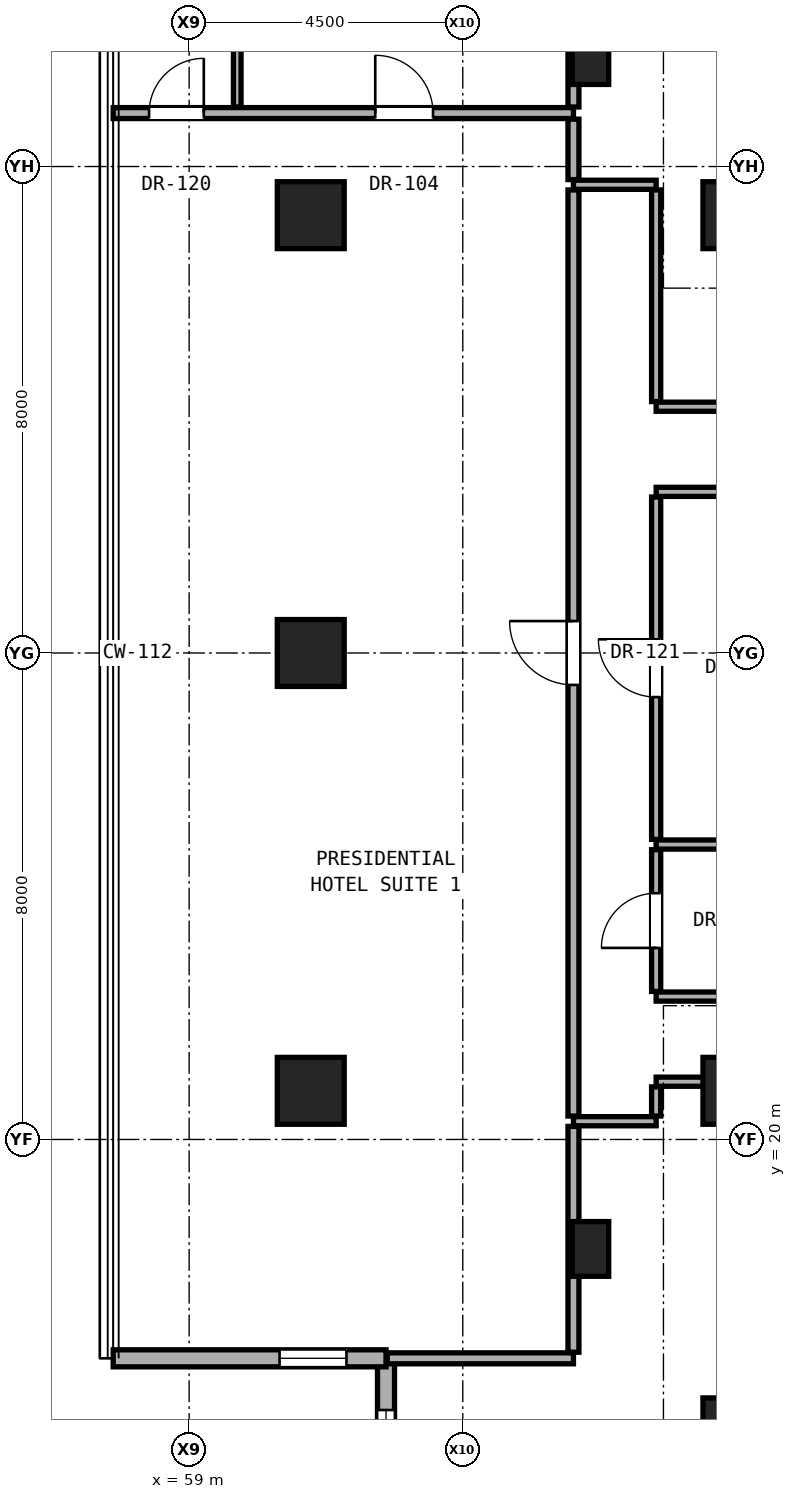
"""IFC4 building model, lengths in metres.
Left out: names, types, materials, properties, quantities, classifications, styles, units other than length and angle.
Written with IfcOpenShell. Run it as: python <this file> out.ifc"""

import sys

from ifc_helpers import new_model, si_unit, direction, frame, frame_2d, origin, origin_2d, place, context, subcontext, project, spatial, rectangle, hollow_rectangle, extrude, element, fill, save


model = new_model("IFC4")
c1 = context("Model", 3, precision=1e-05, world=origin(), true_north=direction((0.0, 1.0)))
c2 = subcontext(c1, "Body", "Model", "MODEL_VIEW")
j1 = project(units=[si_unit("LENGTHUNIT", "METRE"), si_unit("PLANEANGLEUNIT", "RADIAN")], contexts=[c1])
p1 = place(None, origin())
s1 = spatial("IfcSite", under=j1, at=p1, CompositionType="ELEMENT")
p2 = place(p1, origin())
s2 = spatial("IfcBuilding", under=s1, at=p2, CompositionType="ELEMENT")
p3 = place(p2, frame((0.0, 0.0, 144.5)))
s3 = spatial("IfcBuildingStorey", under=s2, at=p3, CompositionType="ELEMENT", Elevation=144.5)
for number, where, z_axis, x_axis in (
    (1, (68.0, 15.2, 0.0), (0.0, 0.0, 1.0), (1.0, 0.0, 0.0)),
    (2, (68.0, 20.8, 0.0), (0.0, 0.0, 1.0), (1.0, 0.0, 0.0)),
    (3, (68.0, 35.2, 0.0), (0.0, 0.0, 1.0), (1.0, 0.0, 0.0)),
):
    element("IfcColumn", number, at=place(p3, frame(where, z_axis=z_axis, x_axis=x_axis)), inside=s3, PredefinedType="COLUMN", context=c2, shape_type="SweptSolid", body=[
        extrude(rectangle(XDim=1.1, YDim=1.1, at=origin_2d()), origin(), (0.0, 0.0, 1.0), 3.3),
    ])
for number, where, z_axis, x_axis in (
    (4, (61.0, 20.8, 0.0), (0.0, 0.0, 1.0), (1.0, 0.0, 0.0)),
    (5, (61.0, 28.0, 0.0), (0.0, 0.0, 1.0), (1.0, 0.0, 0.0)),
    (6, (61.0, 35.2, 0.0), (0.0, 0.0, 1.0), (1.0, 0.0, 0.0)),
):
    element("IfcColumn", number, at=place(p3, frame(where, z_axis=z_axis, x_axis=x_axis)), inside=s3, PredefinedType="COLUMN", context=c2, shape_type="SweptSolid", body=[
        extrude(hollow_rectangle(XDim=1.1, YDim=1.1, WallThickness=0.06, at=origin_2d()), origin(), (0.0, 0.0, 1.0), 3.3),
    ])
for number, where, z_axis, x_axis in (
    (7, (65.6, 18.2, 0.0), (0.0, 0.0, 1.0), (1.0, 0.0, 0.0)),
    (8, (65.6, 37.8, 0.0), (0.0, 0.0, 1.0), (1.0, 0.0, 0.0)),
):
    element("IfcColumn", number, at=place(p3, frame(where, z_axis=z_axis, x_axis=x_axis)), inside=s3, PredefinedType="PILASTER", context=c2, shape_type="SweptSolid", body=[
        extrude(rectangle(XDim=0.6, YDim=0.9, at=origin_2d()), origin(), (0.0, 0.0, 1.0), 3.3),
    ])
p4 = place(p3, frame((62.238, 16.401, 0.0), z_axis=(0.0, 0.0, 1.0), x_axis=(0.0, -1.0, 0.0)))
e9 = element("IfcWall", 9, at=p4, inside=s3, PredefinedType="SOLIDWALL", context=c2, shape_type="SweptSolid", body=[
    extrude(rectangle(XDim=4.487, YDim=0.28, at=frame_2d((2.243, 0.0))), origin(), (0.0, 0.0, 1.0), 2.56),
])
p5 = place(p4, frame((0.85, 0.0, 0.31)))
e10 = element("IfcOpeningElement", 10, at=p5, cuts=e9, PredefinedType="OPENING", context=c2, shape_type="SweptSolid", body=[
    extrude(rectangle(XDim=1.2, YDim=2.1, at=frame_2d((0.6, 1.05))), frame((0.0, 0.15, 0.0), z_axis=(0.0, -1.0, 0.0), x_axis=(1.0, 0.0, 0.0)), (0.0, 0.0, 1.0), 0.3),
])
p6 = place(p3, frame((57.751, 16.401, 0.0), z_axis=(0.0, 0.0, 1.0), x_axis=(1.0, 0.0, 0.0)))
e11 = element("IfcWall", 11, at=p6, inside=s3, PredefinedType="SOLIDWALL", context=c2, shape_type="SweptSolid", body=[
    extrude(rectangle(XDim=4.487, YDim=0.28, at=frame_2d((2.243, 0.0))), origin(), (0.0, 0.0, 1.0), 2.56),
])
p7 = place(p6, frame((2.736, 0.0, 0.41)))
e12 = element("IfcOpeningElement", 12, at=p7, cuts=e11, PredefinedType="OPENING", context=c2, shape_type="SweptSolid", body=[
    extrude(rectangle(XDim=1.1, YDim=2.0, at=frame_2d((0.55, 1.0))), frame((0.0, 0.15, 0.0), z_axis=(0.0, -1.0, 0.0), x_axis=(1.0, 0.0, 0.0)), (0.0, 0.0, 1.0), 0.3),
])
p8 = place(p3, frame((62.258, 16.401, 0.0), z_axis=(0.0, 0.0, 1.0), x_axis=(1.0, 0.0, 0.0)))
e13 = element("IfcWall", 13, at=p8, inside=s3, PredefinedType="PARTITIONING", context=c2, shape_type="SweptSolid", body=[
    extrude(rectangle(XDim=3.062, YDim=0.18, at=frame_2d((1.531, 0.0))), origin(), (0.0, 0.0, 1.0), 2.94),
])
p9 = place(p3, frame((65.32, 20.3, 0.0), z_axis=(0.0, 0.0, 1.0), x_axis=(1.0, 0.0, 0.0)))
e14 = element("IfcWall", 14, at=p9, inside=s3, PredefinedType="PARTITIONING", context=c2, shape_type="SweptSolid", body=[
    extrude(rectangle(XDim=1.36, YDim=0.15, at=frame_2d((0.68, 0.0))), origin(), (0.0, 0.0, 1.0), 2.94),
])
p10 = place(p3, frame((66.68, 20.95, 0.0), z_axis=(0.0, 0.0, 1.0), x_axis=(1.0, 0.0, 0.0)))
e15 = element("IfcWall", 15, at=p10, inside=s3, PredefinedType="PARTITIONING", context=c2, shape_type="SweptSolid", body=[
    extrude(rectangle(XDim=1.05, YDim=0.15, at=frame_2d((0.525, 0.0))), origin(), (0.0, 0.0, 1.0), 2.332),
])
p11 = place(p3, frame((66.68, 22.35, 0.0), z_axis=(0.0, 0.0, 1.0), x_axis=(1.0, 0.0, 0.0)))
e16 = element("IfcWall", 16, at=p11, inside=s3, PredefinedType="PARTITIONING", context=c2, shape_type="SweptSolid", body=[
    extrude(rectangle(XDim=19.5, YDim=0.15, at=frame_2d((9.75, 0.0))), origin(), (0.0, 0.0, 1.0), 2.316),
])
p12 = place(p11, frame((8.802, 0.0, 0.0)))
e17 = element("IfcOpeningElement", 17, at=p12, cuts=e16, PredefinedType="OPENING", context=c2, shape_type="SweptSolid", body=[
    extrude(rectangle(XDim=1.05, YDim=2.2, at=frame_2d((0.525, 1.1))), frame((0.0, 0.085, 0.0), z_axis=(0.0, -1.0, 0.0), x_axis=(1.0, 0.0, 0.0)), (0.0, 0.0, 1.0), 0.17),
])
p13 = place(p11, frame((15.846, 0.0, 0.0)))
e18 = element("IfcOpeningElement", 18, at=p13, cuts=e16, PredefinedType="OPENING", context=c2, shape_type="SweptSolid", body=[
    extrude(rectangle(XDim=1.05, YDim=2.2, at=frame_2d((0.525, 1.1))), frame((0.0, 0.085, 0.0), z_axis=(0.0, -1.0, 0.0), x_axis=(1.0, 0.0, 0.0)), (0.0, 0.0, 1.0), 0.17),
])
p14 = place(p3, frame((66.68, 24.85, 0.0), z_axis=(0.0, 0.0, 1.0), x_axis=(1.0, 0.0, 0.0)))
e19 = element("IfcWall", 19, at=p14, inside=s3, PredefinedType="PARTITIONING", context=c2, shape_type="SweptSolid", body=[
    extrude(rectangle(XDim=3.07, YDim=0.15, at=frame_2d((1.535, 0.0))), origin(), (0.0, 0.0, 1.0), 2.316),
])
p15 = place(p3, frame((66.68, 30.65, 0.0), z_axis=(0.0, 0.0, 1.0), x_axis=(1.0, 0.0, 0.0)))
e20 = element("IfcWall", 20, at=p15, inside=s3, PredefinedType="PARTITIONING", context=c2, shape_type="SweptSolid", body=[
    extrude(rectangle(XDim=19.5, YDim=0.15, at=frame_2d((9.75, 0.0))), origin(), (0.0, 0.0, 1.0), 2.316),
])
p16 = place(p15, frame((3.745, 0.0, 0.0)))
e21 = element("IfcOpeningElement", 21, at=p16, cuts=e20, PredefinedType="OPENING", context=c2, shape_type="SweptSolid", body=[
    extrude(rectangle(XDim=0.95, YDim=2.15, at=frame_2d((0.475, 1.075))), frame((0.0, 0.085, 0.0), z_axis=(0.0, -1.0, 0.0), x_axis=(1.0, 0.0, 0.0)), (0.0, 0.0, 1.0), 0.17),
])
p17 = place(p15, frame((8.802, 0.0, 0.0)))
e22 = element("IfcOpeningElement", 22, at=p17, cuts=e20, PredefinedType="OPENING", context=c2, shape_type="SweptSolid", body=[
    extrude(rectangle(XDim=1.05, YDim=2.2, at=frame_2d((0.525, 1.1))), frame((0.0, 0.085, 0.0), z_axis=(0.0, -1.0, 0.0), x_axis=(1.0, 0.0, 0.0)), (0.0, 0.0, 1.0), 0.17),
])
p18 = place(p15, frame((15.846, 0.0, 0.0)))
e23 = element("IfcOpeningElement", 23, at=p18, cuts=e20, PredefinedType="OPENING", context=c2, shape_type="SweptSolid", body=[
    extrude(rectangle(XDim=1.05, YDim=2.2, at=frame_2d((0.525, 1.1))), frame((0.0, 0.085, 0.0), z_axis=(0.0, -1.0, 0.0), x_axis=(1.0, 0.0, 0.0)), (0.0, 0.0, 1.0), 0.17),
])
p19 = place(p3, frame((66.68, 32.05, 0.0), z_axis=(0.0, 0.0, 1.0), x_axis=(1.0, 0.0, 0.0)))
e24 = element("IfcWall", 24, at=p19, inside=s3, PredefinedType="PARTITIONING", context=c2, shape_type="SweptSolid", body=[
    extrude(rectangle(XDim=2.12, YDim=0.15, at=frame_2d((1.06, 0.0))), origin(), (0.0, 0.0, 1.0), 2.316),
])
p20 = place(p3, frame((65.32, 35.7, 0.0), z_axis=(0.0, 0.0, 1.0), x_axis=(1.0, 0.0, 0.0)))
e25 = element("IfcWall", 25, at=p20, inside=s3, PredefinedType="PARTITIONING", context=c2, shape_type="SweptSolid", body=[
    extrude(rectangle(XDim=1.36, YDim=0.15, at=frame_2d((0.68, 0.0))), origin(), (0.0, 0.0, 1.0), 2.94),
])
p21 = place(p3, frame((57.751, 36.879, 0.0), z_axis=(0.0, 0.0, 1.0), x_axis=(1.0, 0.0, 0.0)))
e26 = element("IfcWall", 26, at=p21, inside=s3, PredefinedType="PARTITIONING", context=c2, shape_type="SweptSolid", body=[
    extrude(rectangle(XDim=7.569, YDim=0.18, at=frame_2d((3.785, 0.0))), origin(), (0.0, 0.0, 1.0), 2.383),
])
p22 = place(p21, frame((4.31, 0.0, 0.0)))
e27 = element("IfcOpeningElement", 27, at=p22, cuts=e26, PredefinedType="OPENING", context=c2, shape_type="SweptSolid", body=[
    extrude(rectangle(XDim=0.95, YDim=2.15, at=frame_2d((0.475, 1.075))), frame((0.0, 0.1, 0.0), z_axis=(0.0, -1.0, 0.0), x_axis=(1.0, 0.0, 0.0)), (0.0, 0.0, 1.0), 0.2),
])
p23 = place(p21, frame((0.59, 0.0, 0.0)))
e28 = element("IfcOpeningElement", 28, at=p23, cuts=e26, PredefinedType="OPENING", context=c2, shape_type="SweptSolid", body=[
    extrude(rectangle(XDim=0.9, YDim=2.1, at=frame_2d((0.45, 1.05))), frame((0.0, 0.1, 0.0), z_axis=(0.0, -1.0, 0.0), x_axis=(1.0, 0.0, 0.0)), (0.0, 0.0, 1.0), 0.2),
])
p24 = place(p3, frame((59.791, 36.979, 0.0), z_axis=(0.0, 0.0, 1.0), x_axis=(0.0, 1.0, 0.0)))
e29 = element("IfcWall", 29, at=p24, inside=s3, PredefinedType="PARTITIONING", context=c2, shape_type="SweptSolid", body=[
    extrude(rectangle(XDim=2.62, YDim=0.125, at=frame_2d((1.31, 0.0))), origin(), (0.0, 0.0, 1.0), 2.94),
])
p25 = place(p3, frame((65.32, 16.501, 0.0), z_axis=(0.0, 0.0, 1.0), x_axis=(0.0, 1.0, 0.0)))
e30 = element("IfcWall", 30, at=p25, inside=s3, PredefinedType="PARTITIONING", context=c2, shape_type="SweptSolid", body=[
    extrude(rectangle(XDim=3.714, YDim=0.18, at=frame_2d((1.857, 0.0))), origin(), (0.0, 0.0, 1.0), 2.383),
])
p26 = place(p3, frame((65.32, 20.385, 0.0), z_axis=(0.0, 0.0, 1.0), x_axis=(0.0, 1.0, 0.0)))
e31 = element("IfcWall", 31, at=p26, inside=s3, PredefinedType="PARTITIONING", context=c2, shape_type="SweptSolid", body=[
    extrude(rectangle(XDim=15.23, YDim=0.18, at=frame_2d((7.615, 0.0))), origin(), (0.0, 0.0, 1.0), 2.316),
])
p27 = place(p26, frame((7.09, 0.0, 0.0)))
e32 = element("IfcOpeningElement", 32, at=p27, cuts=e31, PredefinedType="OPENING", context=c2, shape_type="SweptSolid", body=[
    extrude(rectangle(XDim=1.05, YDim=2.2, at=frame_2d((0.525, 1.1))), frame((0.0, 0.1, 0.0), z_axis=(0.0, -1.0, 0.0), x_axis=(1.0, 0.0, 0.0)), (0.0, 0.0, 1.0), 0.2),
])
p28 = place(p3, frame((65.32, 35.785, 0.0), z_axis=(0.0, 0.0, 1.0), x_axis=(0.0, 1.0, 0.0)))
e33 = element("IfcWall", 33, at=p28, inside=s3, PredefinedType="PARTITIONING", context=c2, shape_type="SweptSolid", body=[
    extrude(rectangle(XDim=0.994, YDim=0.18, at=frame_2d((0.497, 0.0))), origin(), (0.0, 0.0, 1.0), 2.94),
])
p29 = place(p3, frame((65.32, 36.979, 0.0), z_axis=(0.0, 0.0, 1.0), x_axis=(0.0, 1.0, 0.0)))
e34 = element("IfcWall", 34, at=p29, inside=s3, PredefinedType="PARTITIONING", context=c2, shape_type="SweptSolid", body=[
    extrude(rectangle(XDim=2.548, YDim=0.18, at=frame_2d((1.274, 0.0))), origin(), (0.0, 0.0, 1.0), 2.383),
])
p30 = place(p3, frame((66.68, 20.385, 0.0), z_axis=(0.0, 0.0, 1.0), x_axis=(0.0, 1.0, 0.0)))
e35 = element("IfcWall", 35, at=p30, inside=s3, PredefinedType="PARTITIONING", context=c2, shape_type="SweptSolid", body=[
    extrude(rectangle(XDim=0.48, YDim=0.15, at=frame_2d((0.24, 0.0))), origin(), (0.0, 0.0, 1.0), 2.332),
])
p31 = place(p3, frame((66.68, 22.435, 0.0), z_axis=(0.0, 0.0, 1.0), x_axis=(0.0, 1.0, 0.0)))
e36 = element("IfcWall", 36, at=p31, inside=s3, PredefinedType="PARTITIONING", context=c2, shape_type="SweptSolid", body=[
    extrude(rectangle(XDim=2.33, YDim=0.15, at=frame_2d((1.165, 0.0))), origin(), (0.0, 0.0, 1.0), 2.94),
])
p32 = place(p31, frame((0.715, 0.0, 0.0)))
e37 = element("IfcOpeningElement", 37, at=p32, cuts=e36, PredefinedType="OPENING", context=c2, shape_type="SweptSolid", body=[
    extrude(rectangle(XDim=0.9, YDim=2.1, at=frame_2d((0.45, 1.05))), frame((0.0, 0.085, 0.0), z_axis=(0.0, -1.0, 0.0), x_axis=(1.0, 0.0, 0.0)), (0.0, 0.0, 1.0), 0.17),
])
p33 = place(p3, frame((66.68, 24.935, 0.0), z_axis=(0.0, 0.0, 1.0), x_axis=(0.0, 1.0, 0.0)))
e38 = element("IfcWall", 38, at=p33, inside=s3, PredefinedType="PARTITIONING", context=c2, shape_type="SweptSolid", body=[
    extrude(rectangle(XDim=5.63, YDim=0.15, at=frame_2d((2.815, 0.0))), origin(), (0.0, 0.0, 1.0), 2.316),
])
p34 = place(p33, frame((2.34, 0.0, 0.0)))
e39 = element("IfcOpeningElement", 39, at=p34, cuts=e38, PredefinedType="OPENING", context=c2, shape_type="SweptSolid", body=[
    extrude(rectangle(XDim=0.95, YDim=2.15, at=frame_2d((0.475, 1.075))), frame((0.0, 0.085, 0.0), z_axis=(0.0, -1.0, 0.0), x_axis=(1.0, 0.0, 0.0)), (0.0, 0.0, 1.0), 0.17),
])
p35 = place(p3, frame((66.68, 32.135, 0.0), z_axis=(0.0, 0.0, 1.0), x_axis=(0.0, 1.0, 0.0)))
e40 = element("IfcWall", 40, at=p35, inside=s3, PredefinedType="PARTITIONING", context=c2, shape_type="SweptSolid", body=[
    extrude(rectangle(XDim=3.48, YDim=0.15, at=frame_2d((1.74, 0.0))), origin(), (0.0, 0.0, 1.0), 2.332),
])
p36 = place(p5, origin())
e41 = element("IfcWindow", 41, at=p36, inside=s3, PartitioningType="SINGLE_PANEL", PredefinedType="WINDOW", context=c2, shape_type="SweptSolid", body=[
    extrude(rectangle(XDim=1.2, YDim=2.1, at=frame_2d((0.6, 1.05))), frame((0.0, 0.03, 0.0), z_axis=(0.0, -1.0, 0.0), x_axis=(1.0, 0.0, 0.0)), (0.0, 0.0, 1.0), 0.06),
])
fill(e10, e41)
p37 = place(p7, origin())
e42 = element("IfcWindow", 42, at=p37, inside=s3, PartitioningType="SINGLE_PANEL", PredefinedType="WINDOW", context=c2, shape_type="SweptSolid", body=[
    extrude(rectangle(XDim=1.1, YDim=2.0, at=frame_2d((0.55, 1.0))), frame((0.0, 0.03, 0.0), z_axis=(0.0, -1.0, 0.0), x_axis=(1.0, 0.0, 0.0)), (0.0, 0.0, 1.0), 0.06),
])
fill(e12, e42)
p38 = place(p32, origin())
e43 = element("IfcDoor", 43, at=p38, inside=s3, OperationType="SINGLE_SWING_LEFT", PredefinedType="DOOR", context=c2, shape_type="SweptSolid", body=[
    extrude(rectangle(XDim=0.9, YDim=2.1, at=frame_2d((0.45, 1.05))), frame((0.0, 0.025, 0.0), z_axis=(0.0, -1.0, 0.0), x_axis=(1.0, 0.0, 0.0)), (0.0, 0.0, 1.0), 0.05),
])
fill(e37, e43)
p39 = place(p27, origin())
e44 = element("IfcDoor", 44, at=p39, inside=s3, OperationType="SINGLE_SWING_RIGHT", PredefinedType="DOOR", context=c2, shape_type="SweptSolid", body=[
    extrude(rectangle(XDim=1.05, YDim=2.2, at=frame_2d((0.525, 1.1))), frame((0.0, 0.025, 0.0), z_axis=(0.0, -1.0, 0.0), x_axis=(1.0, 0.0, 0.0)), (0.0, 0.0, 1.0), 0.05),
])
fill(e32, e44)
p40 = place(p22, origin())
e45 = element("IfcDoor", 45, at=p40, inside=s3, OperationType="SINGLE_SWING_LEFT", PredefinedType="DOOR", context=c2, shape_type="SweptSolid", body=[
    extrude(rectangle(XDim=0.95, YDim=2.15, at=frame_2d((0.475, 1.075))), frame((0.0, 0.025, 0.0), z_axis=(0.0, -1.0, 0.0), x_axis=(1.0, 0.0, 0.0)), (0.0, 0.0, 1.0), 0.05),
])
fill(e27, e45)
p41 = place(p23, origin())
e46 = element("IfcDoor", 46, at=p41, inside=s3, OperationType="SINGLE_SWING_RIGHT", PredefinedType="DOOR", context=c2, shape_type="SweptSolid", body=[
    extrude(rectangle(XDim=0.9, YDim=2.1, at=frame_2d((0.45, 1.05))), frame((0.0, 0.025, 0.0), z_axis=(0.0, -1.0, 0.0), x_axis=(1.0, 0.0, 0.0)), (0.0, 0.0, 1.0), 0.05),
])
fill(e28, e46)
p42 = place(p34, origin())
e47 = element("IfcDoor", 47, at=p42, inside=s3, OperationType="SINGLE_SWING_RIGHT", PredefinedType="DOOR", context=c2, shape_type="SweptSolid", body=[
    extrude(rectangle(XDim=0.95, YDim=2.15, at=frame_2d((0.475, 1.075))), frame((0.0, 0.025, 0.0), z_axis=(0.0, -1.0, 0.0), x_axis=(1.0, 0.0, 0.0)), (0.0, 0.0, 1.0), 0.05),
])
fill(e39, e47)
save(model, sys.argv[1])
